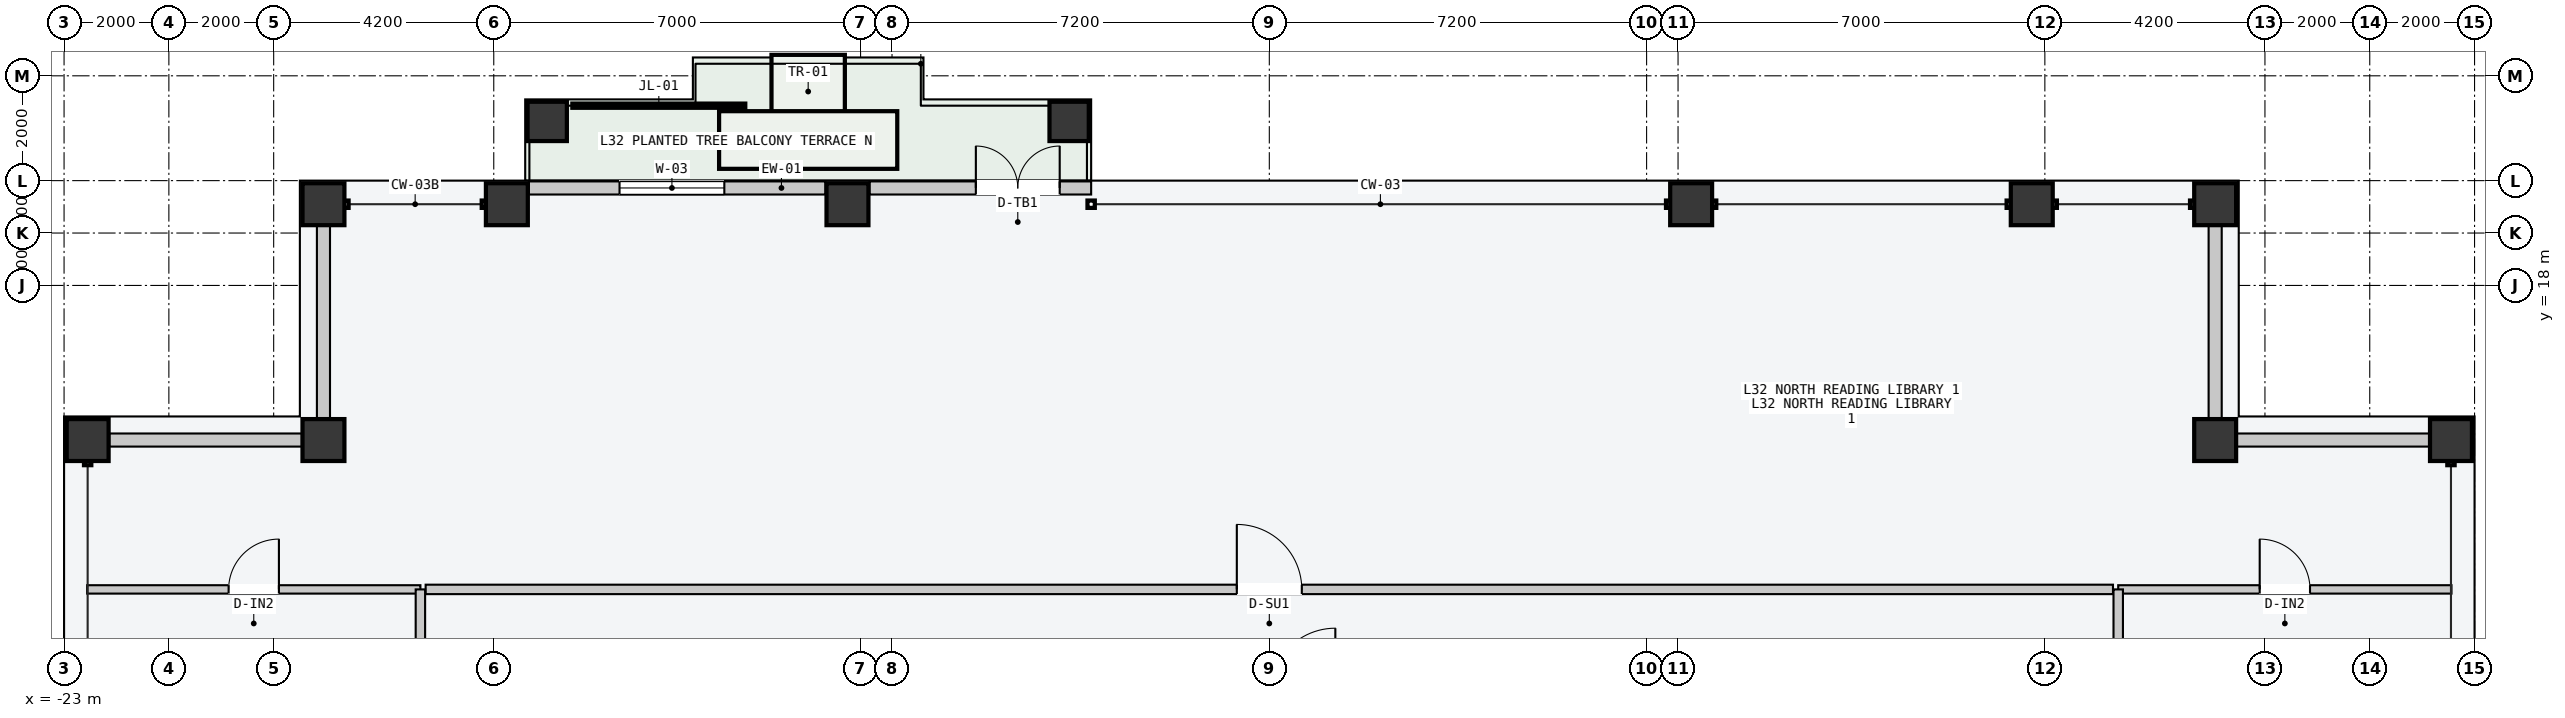
"""IFC4 building model, lengths in metres.
Left out: names, types, materials, properties, quantities, classifications, styles, units other than length and angle.
Written with IfcOpenShell. Run it as: python <this file> out.ifc"""

import sys

from ifc_helpers import new_model, si_unit, direction, frame, frame_2d, origin, origin_2d, place, context, subcontext, project, spatial, rectangle, hollow_rectangle, extrude, element, fill, save


model = new_model("IFC4")
c1 = context("Model", 3, precision=1e-05, world=origin(), true_north=direction((0.0, 1.0)))
c2 = subcontext(c1, "Body", "Model", "MODEL_VIEW")
j1 = project(units=[si_unit("LENGTHUNIT", "METRE"), si_unit("PLANEANGLEUNIT", "RADIAN")], contexts=[c1])
p1 = place(None, origin())
s1 = spatial("IfcSite", under=j1, at=p1, CompositionType="ELEMENT")
p2 = place(p1, origin())
s2 = spatial("IfcBuilding", under=s1, at=p2, CompositionType="ELEMENT")
p3 = place(p2, frame((0.0, 0.0, 124.2)))
s3 = spatial("IfcBuildingStorey", under=s2, at=p3, CompositionType="ELEMENT", Elevation=124.2)
for number, where, z_axis, x_axis in (
    (1, (-18.05, 19.55, 0.0), (0.0, 0.0, 1.0), (1.0, 0.0, 0.0)),
    (2, (-14.55, 19.55, 0.0), (0.0, 0.0, 1.0), (1.0, 0.0, 0.0)),
    (3, (-8.05, 19.55, 0.0), (0.0, 0.0, 1.0), (1.0, 0.0, 0.0)),
    (4, (8.05, 19.55, 0.0), (0.0, 0.0, 1.0), (1.0, 0.0, 0.0)),
    (5, (14.55, 19.55, 0.0), (0.0, 0.0, 1.0), (1.0, 0.0, 0.0)),
    (6, (18.05, 19.55, 0.0), (0.0, 0.0, 1.0), (1.0, 0.0, 0.0)),
    (7, (-22.55, 15.05, 0.0), (0.0, 0.0, 1.0), (0.0, 1.0, 0.0)),
    (8, (22.55, 15.05, 0.0), (0.0, 0.0, 1.0), (0.0, 1.0, 0.0)),
    (9, (-18.05, 15.05, 0.0), (0.0, 0.0, 1.0), (1.0, 0.0, 0.0)),
    (10, (18.05, 15.05, 0.0), (0.0, 0.0, 1.0), (1.0, 0.0, 0.0)),
):
    element("IfcColumn", number, at=place(p3, frame(where, z_axis=z_axis, x_axis=x_axis)), inside=s3, PredefinedType="COLUMN", context=c2, shape_type="SweptSolid", body=[
        extrude(hollow_rectangle(XDim=0.8, YDim=0.8, WallThickness=0.036, at=origin_2d()), origin(), (0.0, 0.0, 1.0), 3.6),
    ])
for number, where, z_axis, x_axis in (
    (11, (-13.78, 21.13, 0.0), (0.0, 0.0, 1.0), (1.0, 0.0, 0.0)),
    (12, (-3.82, 21.13, 0.0), (0.0, 0.0, 1.0), (1.0, 0.0, 0.0)),
):
    element("IfcColumn", number, at=place(p3, frame(where, z_axis=z_axis, x_axis=x_axis)), inside=s3, PredefinedType="COLUMN", context=c2, shape_type="SweptSolid", body=[
        extrude(hollow_rectangle(XDim=0.75, YDim=0.75, WallThickness=0.032, at=origin_2d()), origin(), (0.0, 0.0, 1.0), 3.6),
    ])
p4 = place(p3, frame((-14.13, 19.86, 0.0), z_axis=(0.0, 0.0, 1.0), x_axis=(1.0, 0.0, 0.0)))
e13 = element("IfcWall", 13, at=p4, inside=s3, PredefinedType="STANDARD", context=c2, shape_type="SweptSolid", body=[
    extrude(rectangle(XDim=5.66, YDim=0.25, at=frame_2d((2.83, 0.0))), origin(), (0.0, 0.0, 1.0), 3.4),
])
p5 = place(p4, frame((1.73, 0.0, 0.85)))
e14 = element("IfcOpeningElement", 14, at=p5, cuts=e13, PredefinedType="OPENING", context=c2, shape_type="SweptSolid", body=[
    extrude(rectangle(XDim=2.0, YDim=2.1, at=frame_2d((1.0, 1.05))), frame((0.0, 0.135, 0.0), z_axis=(0.0, -1.0, 0.0), x_axis=(1.0, 0.0, 0.0)), (0.0, 0.0, 1.0), 0.27),
])
p6 = place(p3, frame((-7.63, 19.86, 0.0), z_axis=(0.0, 0.0, 1.0), x_axis=(1.0, 0.0, 0.0)))
e15 = element("IfcWall", 15, at=p6, inside=s3, PredefinedType="STANDARD", context=c2, shape_type="SweptSolid", body=[
    extrude(rectangle(XDim=4.23, YDim=0.25, at=frame_2d((2.115, 0.0))), origin(), (0.0, 0.0, 1.0), 3.4),
])
p7 = place(p6, frame((2.03, 0.0, 0.0)))
e16 = element("IfcOpeningElement", 16, at=p7, cuts=e15, PredefinedType="OPENING", context=c2, shape_type="SweptSolid", body=[
    extrude(rectangle(XDim=1.6, YDim=2.2, at=frame_2d((0.8, 1.1))), frame((0.0, 0.135, 0.0), z_axis=(0.0, -1.0, 0.0), x_axis=(1.0, 0.0, 0.0)), (0.0, 0.0, 1.0), 0.27),
])
for number, where, z_axis, x_axis in (
    (17, (-22.14, 15.05, 0.0), (0.0, 0.0, 1.0), (1.0, 0.0, 0.0)),
    (18, (-18.05, 15.46, 0.0), (0.0, 0.0, 1.0), (0.0, 1.0, 0.0)),
    (19, (18.46, 15.05, 0.0), (0.0, 0.0, 1.0), (1.0, 0.0, 0.0)),
    (20, (18.05, 15.46, 0.0), (0.0, 0.0, 1.0), (0.0, 1.0, 0.0)),
):
    element("IfcWall", number, at=place(p3, frame(where, z_axis=z_axis, x_axis=x_axis)), inside=s3, PredefinedType="STANDARD", context=c2, shape_type="SweptSolid", body=[
        extrude(rectangle(XDim=3.68, YDim=0.25, at=frame_2d((1.84, 0.0))), origin(), (0.0, 0.0, 1.0), 2.75),
    ])
p8 = place(p3, frame((-16.1, 12.2, 0.0), z_axis=(0.0, 0.0, 1.0), x_axis=(1.0, 0.0, 0.0)))
e21 = element("IfcWall", 21, at=p8, inside=s3, PredefinedType="PARTITIONING", context=c2, shape_type="SweptSolid", body=[
    extrude(rectangle(XDim=32.2, YDim=0.18, at=frame_2d((16.1, 0.0))), origin(), (0.0, 0.0, 1.0), 3.4),
])
p9 = place(p8, frame((15.48, 0.0, 0.0)))
e22 = element("IfcOpeningElement", 22, at=p9, cuts=e21, PredefinedType="OPENING", context=c2, shape_type="SweptSolid", body=[
    extrude(rectangle(XDim=1.24, YDim=2.24, at=frame_2d((0.62, 1.12))), frame((0.0, 0.1, 0.0), z_axis=(0.0, -1.0, 0.0), x_axis=(1.0, 0.0, 0.0)), (0.0, 0.0, 1.0), 0.2),
])
p10 = place(p3, frame((-22.56, 12.2, 0.0), z_axis=(0.0, 0.0, 1.0), x_axis=(1.0, 0.0, 0.0)))
e23 = element("IfcWall", 23, at=p10, inside=s3, PredefinedType="PARTITIONING", context=c2, shape_type="SweptSolid", body=[
    extrude(rectangle(XDim=6.36, YDim=0.16, at=frame_2d((3.18, 0.0))), origin(), (0.0, 0.0, 1.0), 3.4),
])
p11 = place(p10, frame((2.7, 0.0, 0.0)))
e24 = element("IfcOpeningElement", 24, at=p11, cuts=e23, PredefinedType="OPENING", context=c2, shape_type="SweptSolid", body=[
    extrude(rectangle(XDim=0.96, YDim=2.18, at=frame_2d((0.48, 1.09))), frame((0.0, 0.09, 0.0), z_axis=(0.0, -1.0, 0.0), x_axis=(1.0, 0.0, 0.0)), (0.0, 0.0, 1.0), 0.18),
])
p12 = place(p3, frame((16.2, 12.2, 0.0), z_axis=(0.0, 0.0, 1.0), x_axis=(1.0, 0.0, 0.0)))
e25 = element("IfcWall", 25, at=p12, inside=s3, PredefinedType="PARTITIONING", context=c2, shape_type="SweptSolid", body=[
    extrude(rectangle(XDim=6.36, YDim=0.16, at=frame_2d((3.18, 0.0))), origin(), (0.0, 0.0, 1.0), 3.4),
])
p13 = place(p12, frame((2.7, 0.0, 0.0)))
e26 = element("IfcOpeningElement", 26, at=p13, cuts=e25, PredefinedType="OPENING", context=c2, shape_type="SweptSolid", body=[
    extrude(rectangle(XDim=0.96, YDim=2.18, at=frame_2d((0.48, 1.09))), frame((0.0, 0.09, 0.0), z_axis=(0.0, -1.0, 0.0), x_axis=(1.0, 0.0, 0.0)), (0.0, 0.0, 1.0), 0.18),
])
for number, where, z_axis, x_axis in (
    (27, (-16.2, 10.25, 0.0), (0.0, 0.0, 1.0), (0.0, 1.0, 0.0)),
    (28, (16.2, 10.25, 0.0), (0.0, 0.0, 1.0), (0.0, 1.0, 0.0)),
):
    element("IfcWall", number, at=place(p3, frame(where, z_axis=z_axis, x_axis=x_axis)), inside=s3, PredefinedType="PARTITIONING", context=c2, shape_type="SweptSolid", body=[
        extrude(rectangle(XDim=1.95, YDim=0.18, at=frame_2d((0.975, 0.0))), origin(), (0.0, 0.0, 1.0), 3.4),
    ])
p14 = place(p5, origin())
e29 = element("IfcWindow", 29, at=p14, inside=s3, PartitioningType="SINGLE_PANEL", PredefinedType="WINDOW", context=c2, shape_type="SweptSolid", body=[
    extrude(rectangle(XDim=2.0, YDim=2.1, at=frame_2d((1.0, 1.05))), frame((0.0, 0.03, 0.0), z_axis=(0.0, -1.0, 0.0), x_axis=(1.0, 0.0, 0.0)), (0.0, 0.0, 1.0), 0.06),
])
fill(e14, e29)
p15 = place(p7, origin())
e30 = element("IfcDoor", 30, at=p15, inside=s3, OperationType="DOUBLE_DOOR_SINGLE_SWING", PredefinedType="DOOR", context=c2, shape_type="SweptSolid", body=[
    extrude(rectangle(XDim=1.6, YDim=2.2, at=frame_2d((0.8, 1.1))), frame((0.0, 0.025, 0.0), z_axis=(0.0, -1.0, 0.0), x_axis=(1.0, 0.0, 0.0)), (0.0, 0.0, 1.0), 0.05),
])
fill(e16, e30)
p16 = place(p9, origin())
e31 = element("IfcDoor", 31, at=p16, inside=s3, OperationType="SINGLE_SWING_LEFT", PredefinedType="DOOR", context=c2, shape_type="SweptSolid", body=[
    extrude(rectangle(XDim=1.24, YDim=2.24, at=frame_2d((0.62, 1.12))), frame((0.0, 0.025, 0.0), z_axis=(0.0, -1.0, 0.0), x_axis=(1.0, 0.0, 0.0)), (0.0, 0.0, 1.0), 0.05),
])
fill(e22, e31)
p17 = place(p11, origin())
e32 = element("IfcDoor", 32, at=p17, inside=s3, OperationType="SINGLE_SWING_RIGHT", PredefinedType="DOOR", context=c2, shape_type="SweptSolid", body=[
    extrude(rectangle(XDim=0.96, YDim=2.18, at=frame_2d((0.48, 1.09))), frame((0.0, 0.025, 0.0), z_axis=(0.0, -1.0, 0.0), x_axis=(1.0, 0.0, 0.0)), (0.0, 0.0, 1.0), 0.05),
])
fill(e24, e32)
p18 = place(p13, origin())
e33 = element("IfcDoor", 33, at=p18, inside=s3, OperationType="SINGLE_SWING_LEFT", PredefinedType="DOOR", context=c2, shape_type="SweptSolid", body=[
    extrude(rectangle(XDim=0.96, YDim=2.18, at=frame_2d((0.48, 1.09))), frame((0.0, 0.025, 0.0), z_axis=(0.0, -1.0, 0.0), x_axis=(1.0, 0.0, 0.0)), (0.0, 0.0, 1.0), 0.05),
])
fill(e26, e33)
save(model, sys.argv[1])
